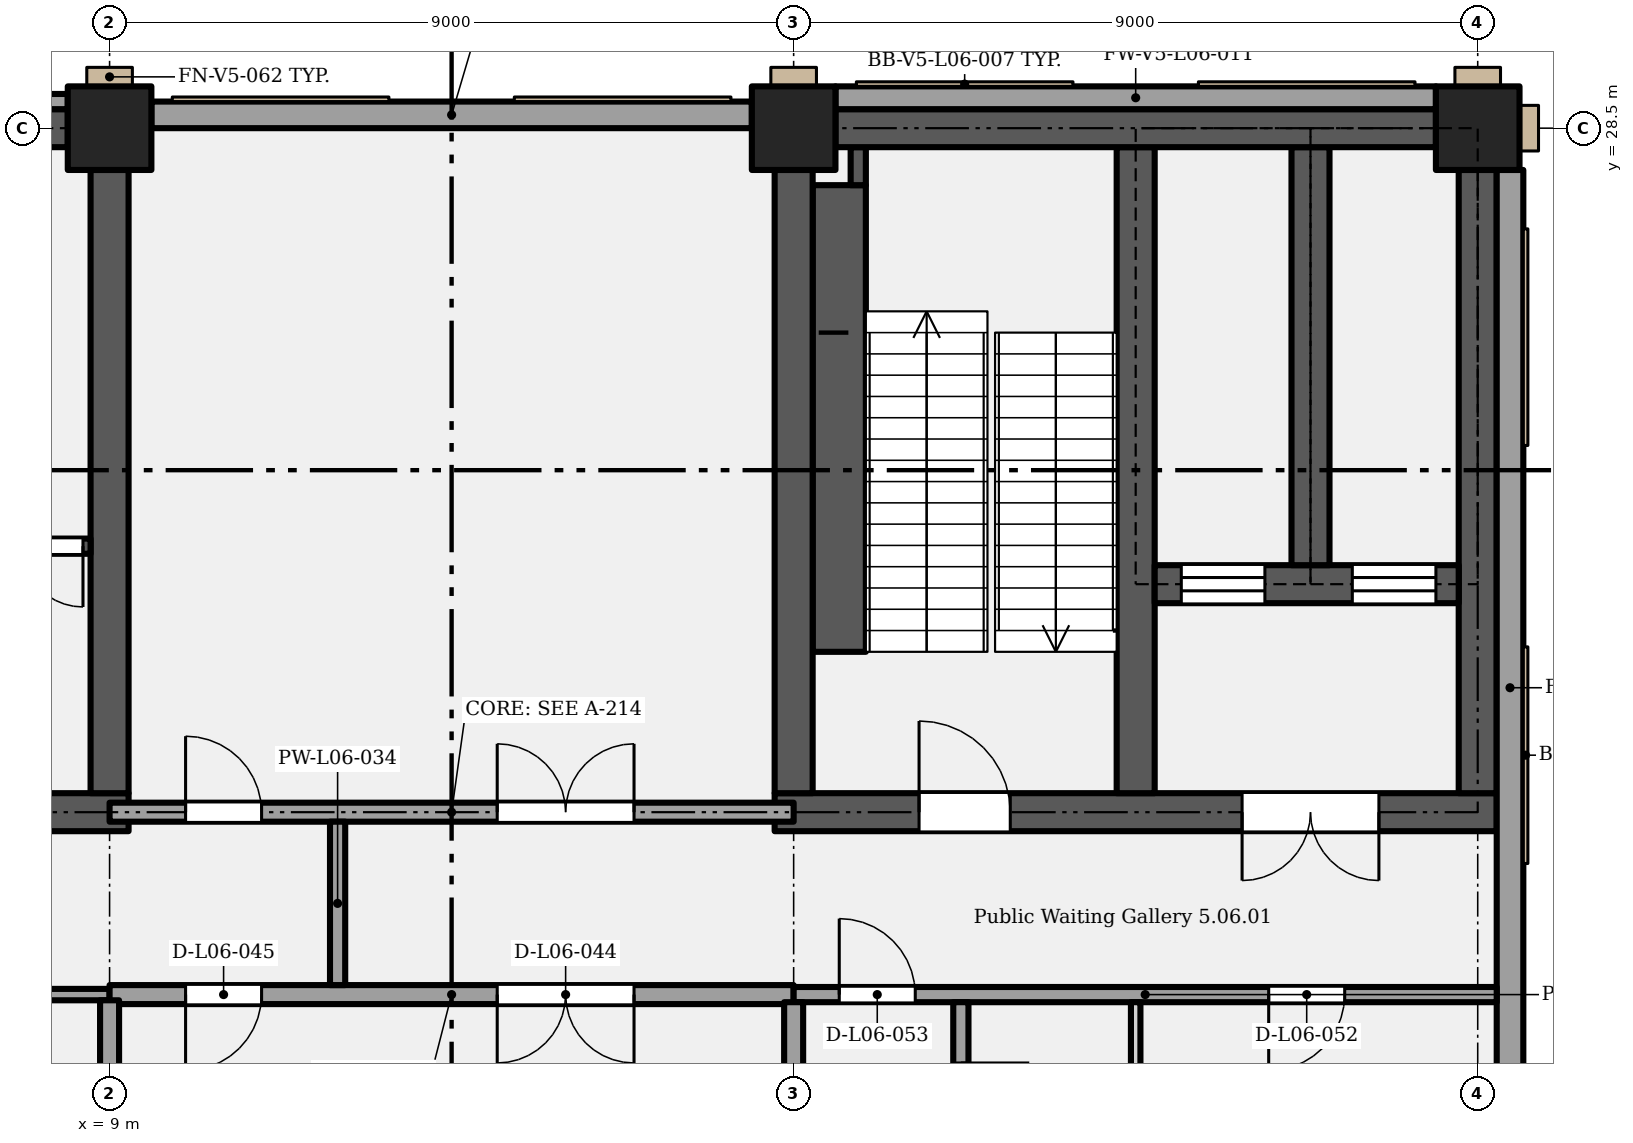
"""IFC4 building model, lengths in metres.
Left out: names, types, materials, properties, quantities, classifications, styles, units other than length and angle.
Written with IfcOpenShell. Run it as: python <this file> out.ifc"""

import sys

from ifc_helpers import new_model, si_unit, direction, frame, frame_2d, origin, origin_2d, place, context, subcontext, project, spatial, rectangle, extrude, element, fill, save


model = new_model("IFC4")
c1 = context("Model", 3, precision=1e-05, world=origin(), true_north=direction((0.0, 1.0)))
c2 = subcontext(c1, "Body", "Model", "MODEL_VIEW")
j1 = project(units=[si_unit("LENGTHUNIT", "METRE"), si_unit("PLANEANGLEUNIT", "RADIAN")], contexts=[c1])
p1 = place(None, origin())
s1 = spatial("IfcSite", under=j1, at=p1, CompositionType="ELEMENT")
p2 = place(p1, origin())
s2 = spatial("IfcBuilding", under=s1, at=p2, CompositionType="ELEMENT")
p3 = place(p2, frame((0.0, 0.0, 33.6)))
s3 = spatial("IfcBuildingStorey", under=s2, at=p3, CompositionType="ELEMENT", Elevation=33.6)
for number, where, z_axis, x_axis in (
    (1, (9.0, 28.5, 0.0), (0.0, 0.0, 1.0), (1.0, 0.0, 0.0)),
    (2, (18.0, 28.5, 0.0), (0.0, 0.0, 1.0), (1.0, 0.0, 0.0)),
    (3, (27.0, 28.5, 0.0), (0.0, 0.0, 1.0), (1.0, 0.0, 0.0)),
):
    element("IfcColumn", number, at=place(p3, frame(where, z_axis=z_axis, x_axis=x_axis)), inside=s3, PredefinedType="COLUMN", context=c2, shape_type="SweptSolid", body=[
        extrude(rectangle(XDim=1.1, YDim=1.1, at=origin_2d()), origin(), (0.0, 0.0, 1.0), 5.4),
    ])
p4 = place(p3, frame((-0.25, 19.5, 0.0), z_axis=(0.0, 0.0, 1.0), x_axis=(1.0, 0.0, 0.0)))
e4 = element("IfcWall", 4, at=p4, inside=s3, PredefinedType="SHEAR", context=c2, shape_type="SweptSolid", body=[
    extrude(rectangle(XDim=9.5, YDim=0.5, at=frame_2d((4.75, 0.0))), origin(), (0.0, 0.0, 1.0), 5.15),
])
p5 = place(p4, frame((1.9, 0.0, 0.0)))
e5 = element("IfcOpeningElement", 5, at=p5, cuts=e4, PredefinedType="OPENING", context=c2, shape_type="SweptSolid", body=[
    extrude(rectangle(XDim=1.2, YDim=2.1, at=frame_2d((0.6, 1.05))), frame((0.0, 0.26, 0.0), z_axis=(0.0, -1.0, 0.0), x_axis=(1.0, 0.0, 0.0)), (0.0, 0.0, 1.0), 0.52),
])
p6 = place(p4, frame((6.4, 0.0, 0.0)))
e6 = element("IfcOpeningElement", 6, at=p6, cuts=e4, PredefinedType="OPENING", context=c2, shape_type="SweptSolid", body=[
    extrude(rectangle(XDim=1.2, YDim=2.1, at=frame_2d((0.6, 1.05))), frame((0.0, 0.26, 0.0), z_axis=(0.0, -1.0, 0.0), x_axis=(1.0, 0.0, 0.0)), (0.0, 0.0, 1.0), 0.52),
])
p7 = place(p3, frame((17.75, 19.5, 0.0), z_axis=(0.0, 0.0, 1.0), x_axis=(1.0, 0.0, 0.0)))
e7 = element("IfcWall", 7, at=p7, inside=s3, PredefinedType="SHEAR", context=c2, shape_type="SweptSolid", body=[
    extrude(rectangle(XDim=9.5, YDim=0.5, at=frame_2d((4.75, 0.0))), origin(), (0.0, 0.0, 1.0), 5.15),
])
p8 = place(p7, frame((1.9, 0.0, 0.0)))
e8 = element("IfcOpeningElement", 8, at=p8, cuts=e7, PredefinedType="OPENING", context=c2, shape_type="SweptSolid", body=[
    extrude(rectangle(XDim=1.2, YDim=2.1, at=frame_2d((0.6, 1.05))), frame((0.0, 0.26, 0.0), z_axis=(0.0, -1.0, 0.0), x_axis=(1.0, 0.0, 0.0)), (0.0, 0.0, 1.0), 0.52),
])
p9 = place(p7, frame((7.95, 0.0, 0.0), z_axis=(0.0, 0.0, 1.0), x_axis=(-1.0, 0.0, 0.0)))
e9 = element("IfcOpeningElement", 9, at=p9, cuts=e7, PredefinedType="OPENING", context=c2, shape_type="SweptSolid", body=[
    extrude(rectangle(XDim=1.8, YDim=2.1, at=frame_2d((0.9, 1.05))), frame((0.0, 0.26, 0.0), z_axis=(0.0, -1.0, 0.0), x_axis=(1.0, 0.0, 0.0)), (0.0, 0.0, 1.0), 0.52),
])
for number, where, z_axis, x_axis in (
    (10, (9.0, 19.75, 0.0), (0.0, 0.0, 1.0), (0.0, 1.0, 0.0)),
    (11, (18.0, 19.75, 0.0), (0.0, 0.0, 1.0), (0.0, 1.0, 0.0)),
):
    element("IfcWall", number, at=place(p3, frame(where, z_axis=z_axis, x_axis=x_axis)), inside=s3, PredefinedType="SHEAR", context=c2, shape_type="SweptSolid", body=[
        extrude(rectangle(XDim=8.2, YDim=0.5, at=frame_2d((4.1, 0.0))), origin(), (0.0, 0.0, 1.0), 5.15),
    ])
p10 = place(p3, frame((22.5, 19.75, 0.0), z_axis=(0.0, 0.0, 1.0), x_axis=(0.0, 1.0, 0.0)))
e12 = element("IfcWall", 12, at=p10, inside=s3, PredefinedType="SHEAR", context=c2, shape_type="SweptSolid", body=[
    extrude(rectangle(XDim=8.5, YDim=0.5, at=frame_2d((4.25, 0.0))), origin(), (0.0, 0.0, 1.0), 5.15),
])
p11 = place(p3, frame((27.0, 19.75, 0.0), z_axis=(0.0, 0.0, 1.0), x_axis=(0.0, 1.0, 0.0)))
e13 = element("IfcWall", 13, at=p11, inside=s3, PredefinedType="SHEAR", context=c2, shape_type="SweptSolid", body=[
    extrude(rectangle(XDim=8.2, YDim=0.5, at=frame_2d((4.1, 0.0))), origin(), (0.0, 0.0, 1.0), 5.15),
])
p12 = place(p3, frame((22.75, 22.5, 0.0), z_axis=(0.0, 0.0, 1.0), x_axis=(1.0, 0.0, 0.0)))
e14 = element("IfcWall", 14, at=p12, inside=s3, PredefinedType="SHEAR", context=c2, shape_type="SweptSolid", body=[
    extrude(rectangle(XDim=4.0, YDim=0.5, at=frame_2d((2.0, 0.0))), origin(), (0.0, 0.0, 1.0), 5.15),
])
p13 = place(p12, frame((0.35, 0.0, 0.0)))
e15 = element("IfcOpeningElement", 15, at=p13, cuts=e14, PredefinedType="OPENING", context=c2, shape_type="SweptSolid", body=[
    extrude(rectangle(XDim=1.1, YDim=2.1, at=frame_2d((0.55, 1.05))), frame((0.0, 0.26, 0.0), z_axis=(0.0, -1.0, 0.0), x_axis=(1.0, 0.0, 0.0)), (0.0, 0.0, 1.0), 0.52),
])
p14 = place(p12, frame((2.6, 0.0, 0.0)))
e16 = element("IfcOpeningElement", 16, at=p14, cuts=e14, PredefinedType="OPENING", context=c2, shape_type="SweptSolid", body=[
    extrude(rectangle(XDim=1.1, YDim=2.1, at=frame_2d((0.55, 1.05))), frame((0.0, 0.26, 0.0), z_axis=(0.0, -1.0, 0.0), x_axis=(1.0, 0.0, 0.0)), (0.0, 0.0, 1.0), 0.52),
])
p15 = place(p3, frame((24.8, 22.75, 0.0), z_axis=(0.0, 0.0, 1.0), x_axis=(0.0, 1.0, 0.0)))
e17 = element("IfcWall", 17, at=p15, inside=s3, PredefinedType="SHEAR", context=c2, shape_type="SweptSolid", body=[
    extrude(rectangle(XDim=5.5, YDim=0.5, at=frame_2d((2.75, 0.0))), origin(), (0.0, 0.0, 1.0), 5.15),
])
p16 = place(p3, frame((0.45, 28.5, 0.0), z_axis=(0.0, 0.0, 1.0), x_axis=(1.0, 0.0, 0.0)))
e18 = element("IfcWall", 18, at=p16, inside=s3, PredefinedType="SHEAR", context=c2, shape_type="SweptSolid", body=[
    extrude(rectangle(XDim=8.0, YDim=0.5, at=frame_2d((4.0, 0.0))), origin(), (0.0, 0.0, 1.0), 5.15),
])
p17 = place(p3, frame((18.55, 28.5, 0.0), z_axis=(0.0, 0.0, 1.0), x_axis=(1.0, 0.0, 0.0)))
e19 = element("IfcWall", 19, at=p17, inside=s3, PredefinedType="SHEAR", context=c2, shape_type="SweptSolid", body=[
    extrude(rectangle(XDim=7.9, YDim=0.5, at=frame_2d((3.95, 0.0))), origin(), (0.0, 0.0, 1.0), 5.15),
])
p18 = place(p3, frame((0.45, 28.85, 0.0), z_axis=(0.0, 0.0, 1.0), x_axis=(1.0, 0.0, 0.0)))
e20 = element("IfcWall", 20, at=p18, inside=s3, PredefinedType="SOLIDWALL", context=c2, shape_type="SweptSolid", body=[
    extrude(rectangle(XDim=8.0, YDim=0.2, at=frame_2d((4.0, 0.0))), origin(), (0.0, 0.0, 1.0), 5.15),
])
p19 = place(p3, frame((9.55, 28.675, 0.0), z_axis=(0.0, 0.0, 1.0), x_axis=(1.0, 0.0, 0.0)))
e21 = element("IfcWall", 21, at=p19, inside=s3, PredefinedType="SOLIDWALL", context=c2, shape_type="SweptSolid", body=[
    extrude(rectangle(XDim=7.9, YDim=0.35, at=frame_2d((3.95, 0.0))), origin(), (0.0, 0.0, 1.0), 5.15),
])
p20 = place(p3, frame((18.55, 28.9, 0.0), z_axis=(0.0, 0.0, 1.0), x_axis=(1.0, 0.0, 0.0)))
e22 = element("IfcWall", 22, at=p20, inside=s3, PredefinedType="SOLIDWALL", context=c2, shape_type="SweptSolid", body=[
    extrude(rectangle(XDim=7.9, YDim=0.3, at=frame_2d((3.95, 0.0))), origin(), (0.0, 0.0, 1.0), 5.15),
])
p21 = place(p3, frame((27.425, 14.325, 0.0), z_axis=(0.0, 0.0, 1.0), x_axis=(0.0, 1.0, 0.0)))
e23 = element("IfcWall", 23, at=p21, inside=s3, PredefinedType="SOLIDWALL", context=c2, shape_type="SweptSolid", body=[
    extrude(rectangle(XDim=13.625, YDim=0.35, at=frame_2d((6.812, 0.0))), origin(), (0.0, 0.0, 1.0), 5.15),
])
p22 = place(p3, frame((-0.25, 17.1, 0.0), z_axis=(0.0, 0.0, 1.0), x_axis=(1.0, 0.0, 0.0)))
e24 = element("IfcWall", 24, at=p22, inside=s3, PredefinedType="PARTITIONING", context=c2, shape_type="SweptSolid", body=[
    extrude(rectangle(XDim=9.25, YDim=0.15, at=frame_2d((4.625, 0.0))), origin(), (0.0, 0.0, 1.0), 5.15),
])
p23 = place(p22, frame((5.25, 0.0, 0.0), z_axis=(0.0, 0.0, 1.0), x_axis=(-1.0, 0.0, 0.0)))
e25 = element("IfcOpeningElement", 25, at=p23, cuts=e24, PredefinedType="OPENING", context=c2, shape_type="SweptSolid", body=[
    extrude(rectangle(XDim=1.0, YDim=2.1, at=frame_2d((0.5, 1.05))), frame((0.0, 0.085, 0.0), z_axis=(0.0, -1.0, 0.0), x_axis=(1.0, 0.0, 0.0)), (0.0, 0.0, 1.0), 0.17),
])
p24 = place(p3, frame((9.0, 17.1, 0.0), z_axis=(0.0, 0.0, 1.0), x_axis=(1.0, 0.0, 0.0)))
e26 = element("IfcWall", 26, at=p24, inside=s3, PredefinedType="PARTITIONING", context=c2, shape_type="SweptSolid", body=[
    extrude(rectangle(XDim=9.0, YDim=0.25, at=frame_2d((4.5, 0.0))), origin(), (0.0, 0.0, 1.0), 5.15),
])
p25 = place(p24, frame((6.9, 0.0, 0.0), z_axis=(0.0, 0.0, 1.0), x_axis=(-1.0, 0.0, 0.0)))
e27 = element("IfcOpeningElement", 27, at=p25, cuts=e26, PredefinedType="OPENING", context=c2, shape_type="SweptSolid", body=[
    extrude(rectangle(XDim=1.8, YDim=2.4, at=frame_2d((0.9, 1.2))), frame((0.0, 0.135, 0.0), z_axis=(0.0, -1.0, 0.0), x_axis=(1.0, 0.0, 0.0)), (0.0, 0.0, 1.0), 0.27),
])
p26 = place(p24, frame((2.0, 0.0, 0.0), z_axis=(0.0, 0.0, 1.0), x_axis=(-1.0, 0.0, 0.0)))
e28 = element("IfcOpeningElement", 28, at=p26, cuts=e26, PredefinedType="OPENING", context=c2, shape_type="SweptSolid", body=[
    extrude(rectangle(XDim=1.0, YDim=2.1, at=frame_2d((0.5, 1.05))), frame((0.0, 0.135, 0.0), z_axis=(0.0, -1.0, 0.0), x_axis=(1.0, 0.0, 0.0)), (0.0, 0.0, 1.0), 0.27),
])
p27 = place(p3, frame((18.0, 17.1, 0.0), z_axis=(0.0, 0.0, 1.0), x_axis=(1.0, 0.0, 0.0)))
e29 = element("IfcWall", 29, at=p27, inside=s3, PredefinedType="PARTITIONING", context=c2, shape_type="SweptSolid", body=[
    extrude(rectangle(XDim=9.25, YDim=0.2, at=frame_2d((4.625, 0.0))), origin(), (0.0, 0.0, 1.0), 5.15),
])
p28 = place(p27, frame((7.25, 0.0, 0.0), z_axis=(0.0, 0.0, 1.0), x_axis=(-1.0, 0.0, 0.0)))
e30 = element("IfcOpeningElement", 30, at=p28, cuts=e29, PredefinedType="OPENING", context=c2, shape_type="SweptSolid", body=[
    extrude(rectangle(XDim=1.0, YDim=2.1, at=frame_2d((0.5, 1.05))), frame((0.0, 0.11, 0.0), z_axis=(0.0, -1.0, 0.0), x_axis=(1.0, 0.0, 0.0)), (0.0, 0.0, 1.0), 0.22),
])
p29 = place(p27, frame((0.6, 0.0, 0.0)))
e31 = element("IfcOpeningElement", 31, at=p29, cuts=e29, PredefinedType="OPENING", context=c2, shape_type="SweptSolid", body=[
    extrude(rectangle(XDim=1.0, YDim=2.1, at=frame_2d((0.5, 1.05))), frame((0.0, 0.11, 0.0), z_axis=(0.0, -1.0, 0.0), x_axis=(1.0, 0.0, 0.0)), (0.0, 0.0, 1.0), 0.22),
])
p30 = place(p3, frame((9.0, 19.5, 0.0), z_axis=(0.0, 0.0, 1.0), x_axis=(1.0, 0.0, 0.0)))
e32 = element("IfcWall", 32, at=p30, inside=s3, PredefinedType="PARTITIONING", context=c2, shape_type="SweptSolid", body=[
    extrude(rectangle(XDim=9.0, YDim=0.25, at=frame_2d((4.5, 0.0))), origin(), (0.0, 0.0, 1.0), 5.15),
])
p31 = place(p30, frame((5.1, 0.0, 0.0)))
e33 = element("IfcOpeningElement", 33, at=p31, cuts=e32, PredefinedType="OPENING", context=c2, shape_type="SweptSolid", body=[
    extrude(rectangle(XDim=1.8, YDim=2.4, at=frame_2d((0.9, 1.2))), frame((0.0, 0.135, 0.0), z_axis=(0.0, -1.0, 0.0), x_axis=(1.0, 0.0, 0.0)), (0.0, 0.0, 1.0), 0.27),
])
p32 = place(p30, frame((1.0, 0.0, 0.0)))
e34 = element("IfcOpeningElement", 34, at=p32, cuts=e32, PredefinedType="OPENING", context=c2, shape_type="SweptSolid", body=[
    extrude(rectangle(XDim=1.0, YDim=2.1, at=frame_2d((0.5, 1.05))), frame((0.0, 0.135, 0.0), z_axis=(0.0, -1.0, 0.0), x_axis=(1.0, 0.0, 0.0)), (0.0, 0.0, 1.0), 0.27),
])
p33 = place(p3, frame((7.5, 23.0, 0.0), z_axis=(0.0, 0.0, 1.0), x_axis=(1.0, 0.0, 0.0)))
e35 = element("IfcWall", 35, at=p33, inside=s3, PredefinedType="SHEAR", context=c2, shape_type="SweptSolid", body=[
    extrude(rectangle(XDim=1.25, YDim=0.2, at=frame_2d((0.625, 0.0))), origin(), (0.0, 0.0, 1.0), 5.15),
])
p34 = place(p33, frame((1.15, 0.0, 0.0), z_axis=(0.0, 0.0, 1.0), x_axis=(-1.0, 0.0, 0.0)))
e36 = element("IfcOpeningElement", 36, at=p34, cuts=e35, PredefinedType="OPENING", context=c2, shape_type="SweptSolid", body=[
    extrude(rectangle(XDim=0.8, YDim=2.0, at=frame_2d((0.4, 1.0))), frame((0.0, 0.11, 0.0), z_axis=(0.0, -1.0, 0.0), x_axis=(1.0, 0.0, 0.0)), (0.0, 0.0, 1.0), 0.22),
])
p35 = place(p3, frame((9.0, 12.55, 0.0), z_axis=(0.0, 0.0, 1.0), x_axis=(0.0, 1.0, 0.0)))
e37 = element("IfcWall", 37, at=p35, inside=s3, PredefinedType="PARTITIONING", context=c2, shape_type="SweptSolid", body=[
    extrude(rectangle(XDim=4.475, YDim=0.25, at=frame_2d((2.237, 0.0))), origin(), (0.0, 0.0, 1.0), 4.2),
])
p36 = place(p3, frame((12.0, 17.225, 0.0), z_axis=(0.0, 0.0, 1.0), x_axis=(0.0, 1.0, 0.0)))
e38 = element("IfcWall", 38, at=p36, inside=s3, PredefinedType="PARTITIONING", context=c2, shape_type="SweptSolid", body=[
    extrude(rectangle(XDim=2.15, YDim=0.2, at=frame_2d((1.075, 0.0))), origin(), (0.0, 0.0, 1.0), 5.15),
])
p37 = place(p3, frame((18.0, 12.55, 0.0), z_axis=(0.0, 0.0, 1.0), x_axis=(0.0, 1.0, 0.0)))
e39 = element("IfcWall", 39, at=p37, inside=s3, PredefinedType="PARTITIONING", context=c2, shape_type="SweptSolid", body=[
    extrude(rectangle(XDim=4.45, YDim=0.25, at=frame_2d((2.225, 0.0))), origin(), (0.0, 0.0, 1.0), 4.2),
])
p38 = place(p3, frame((20.2, 9.663, 0.0), z_axis=(0.0, 0.0, 1.0), x_axis=(0.0, 1.0, 0.0)))
e40 = element("IfcWall", 40, at=p38, inside=s3, PredefinedType="PARTITIONING", context=c2, shape_type="SweptSolid", body=[
    extrude(rectangle(XDim=7.337, YDim=0.2, at=frame_2d((3.669, 0.0))), origin(), (0.0, 0.0, 1.0), 5.15),
])
p39 = place(p38, frame((6.537, 0.0, 0.0), z_axis=(0.0, 0.0, 1.0), x_axis=(-1.0, 0.0, 0.0)))
e41 = element("IfcOpeningElement", 41, at=p39, cuts=e40, PredefinedType="OPENING", context=c2, shape_type="SweptSolid", body=[
    extrude(rectangle(XDim=0.9, YDim=2.1, at=frame_2d((0.45, 1.05))), frame((0.0, 0.11, 0.0), z_axis=(0.0, -1.0, 0.0), x_axis=(1.0, 0.0, 0.0)), (0.0, 0.0, 1.0), 0.22),
])
p40 = place(p38, frame((3.837, 0.0, 0.0), z_axis=(0.0, 0.0, 1.0), x_axis=(-1.0, 0.0, 0.0)))
e42 = element("IfcOpeningElement", 42, at=p40, cuts=e40, PredefinedType="OPENING", context=c2, shape_type="SweptSolid", body=[
    extrude(rectangle(XDim=0.9, YDim=2.1, at=frame_2d((0.45, 1.05))), frame((0.0, 0.11, 0.0), z_axis=(0.0, -1.0, 0.0), x_axis=(1.0, 0.0, 0.0)), (0.0, 0.0, 1.0), 0.22),
])
p41 = place(p38, frame((1.488, 0.0, 0.0), z_axis=(0.0, 0.0, 1.0), x_axis=(-1.0, 0.0, 0.0)))
e43 = element("IfcOpeningElement", 43, at=p41, cuts=e40, PredefinedType="OPENING", context=c2, shape_type="SweptSolid", body=[
    extrude(rectangle(XDim=1.0, YDim=2.1, at=frame_2d((0.5, 1.05))), frame((0.0, 0.11, 0.0), z_axis=(0.0, -1.0, 0.0), x_axis=(1.0, 0.0, 0.0)), (0.0, 0.0, 1.0), 0.22),
])
p42 = place(p3, frame((22.5, 9.663, 0.0), z_axis=(0.0, 0.0, 1.0), x_axis=(0.0, 1.0, 0.0)))
e44 = element("IfcWall", 44, at=p42, inside=s3, PredefinedType="PARTITIONING", context=c2, shape_type="SweptSolid", body=[
    extrude(rectangle(XDim=7.337, YDim=0.125, at=frame_2d((3.669, 0.0))), origin(), (0.0, 0.0, 1.0), 5.15),
])
p43 = place(p3, frame((18.6, 21.61, 0.0), z_axis=(0.0, 0.0, 1.0), x_axis=(0.0, 1.0, 0.0)))
e45 = element("IfcWall", 45, at=p43, inside=s3, PredefinedType="SHEAR", context=c2, shape_type="SweptSolid", body=[
    extrude(rectangle(XDim=6.14, YDim=0.7, at=frame_2d((3.07, 0.0))), origin(), (0.0, 0.0, 1.0), 2.587),
])
p44 = place(p3, frame((18.85, 27.75, 0.0), z_axis=(0.0, 0.0, 1.0), x_axis=(0.0, 1.0, 0.0)))
e46 = element("IfcWall", 46, at=p44, inside=s3, PredefinedType="SHEAR", context=c2, shape_type="SweptSolid", body=[
    extrude(rectangle(XDim=0.5, YDim=0.2, at=frame_2d((0.25, 0.0))), origin(), (0.0, 0.0, 1.0), 2.587),
])
p45 = place(p34, origin())
e47 = element("IfcDoor", 47, at=p45, inside=s3, OperationType="SINGLE_SWING_LEFT", PredefinedType="DOOR", context=c2, shape_type="SweptSolid", body=[
    extrude(rectangle(XDim=0.8, YDim=2.0, at=frame_2d((0.4, 1.0))), frame((0.0, 0.025, 0.0), z_axis=(0.0, -1.0, 0.0), x_axis=(1.0, 0.0, 0.0)), (0.0, 0.0, 1.0), 0.05),
])
fill(e36, e47)
p46 = place(p8, origin())
e48 = element("IfcDoor", 48, at=p46, inside=s3, OperationType="SINGLE_SWING_LEFT", PredefinedType="DOOR", context=c2, shape_type="SweptSolid", body=[
    extrude(rectangle(XDim=1.2, YDim=2.1, at=frame_2d((0.6, 1.05))), frame((0.0, 0.025, 0.0), z_axis=(0.0, -1.0, 0.0), x_axis=(1.0, 0.0, 0.0)), (0.0, 0.0, 1.0), 0.05),
])
fill(e8, e48)
p47 = place(p9, origin())
e49 = element("IfcDoor", 49, at=p47, inside=s3, OperationType="DOUBLE_DOOR_SINGLE_SWING", PredefinedType="DOOR", context=c2, shape_type="SweptSolid", body=[
    extrude(rectangle(XDim=1.8, YDim=2.1, at=frame_2d((0.9, 1.05))), frame((0.0, 0.025, 0.0), z_axis=(0.0, -1.0, 0.0), x_axis=(1.0, 0.0, 0.0)), (0.0, 0.0, 1.0), 0.05),
])
fill(e9, e49)
p48 = place(p13, origin())
e50 = element("IfcDoor", 50, at=p48, inside=s3, OperationType="SLIDING_TO_LEFT", PredefinedType="DOOR", context=c2, shape_type="SweptSolid", body=[
    extrude(rectangle(XDim=1.1, YDim=2.1, at=frame_2d((0.55, 1.05))), frame((0.0, 0.025, 0.0), z_axis=(0.0, -1.0, 0.0), x_axis=(1.0, 0.0, 0.0)), (0.0, 0.0, 1.0), 0.05),
])
fill(e15, e50)
p49 = place(p14, origin())
e51 = element("IfcDoor", 51, at=p49, inside=s3, OperationType="SLIDING_TO_LEFT", PredefinedType="DOOR", context=c2, shape_type="SweptSolid", body=[
    extrude(rectangle(XDim=1.1, YDim=2.1, at=frame_2d((0.55, 1.05))), frame((0.0, 0.025, 0.0), z_axis=(0.0, -1.0, 0.0), x_axis=(1.0, 0.0, 0.0)), (0.0, 0.0, 1.0), 0.05),
])
fill(e16, e51)
p50 = place(p25, origin())
e52 = element("IfcDoor", 52, at=p50, inside=s3, OperationType="DOUBLE_DOOR_SINGLE_SWING", PredefinedType="DOOR", context=c2, shape_type="SweptSolid", body=[
    extrude(rectangle(XDim=1.8, YDim=2.4, at=frame_2d((0.9, 1.2))), frame((0.0, 0.025, 0.0), z_axis=(0.0, -1.0, 0.0), x_axis=(1.0, 0.0, 0.0)), (0.0, 0.0, 1.0), 0.05),
])
fill(e27, e52)
p51 = place(p26, origin())
e53 = element("IfcDoor", 53, at=p51, inside=s3, OperationType="SINGLE_SWING_RIGHT", PredefinedType="DOOR", context=c2, shape_type="SweptSolid", body=[
    extrude(rectangle(XDim=1.0, YDim=2.1, at=frame_2d((0.5, 1.05))), frame((0.0, 0.025, 0.0), z_axis=(0.0, -1.0, 0.0), x_axis=(1.0, 0.0, 0.0)), (0.0, 0.0, 1.0), 0.05),
])
fill(e28, e53)
p52 = place(p31, origin())
e54 = element("IfcDoor", 54, at=p52, inside=s3, OperationType="DOUBLE_DOOR_SINGLE_SWING", PredefinedType="DOOR", context=c2, shape_type="SweptSolid", body=[
    extrude(rectangle(XDim=1.8, YDim=2.4, at=frame_2d((0.9, 1.2))), frame((0.0, 0.025, 0.0), z_axis=(0.0, -1.0, 0.0), x_axis=(1.0, 0.0, 0.0)), (0.0, 0.0, 1.0), 0.05),
])
fill(e33, e54)
p53 = place(p32, origin())
e55 = element("IfcDoor", 55, at=p53, inside=s3, OperationType="SINGLE_SWING_LEFT", PredefinedType="DOOR", context=c2, shape_type="SweptSolid", body=[
    extrude(rectangle(XDim=1.0, YDim=2.1, at=frame_2d((0.5, 1.05))), frame((0.0, 0.025, 0.0), z_axis=(0.0, -1.0, 0.0), x_axis=(1.0, 0.0, 0.0)), (0.0, 0.0, 1.0), 0.05),
])
fill(e34, e55)
p54 = place(p28, origin())
e56 = element("IfcDoor", 56, at=p54, inside=s3, OperationType="SINGLE_SWING_RIGHT", PredefinedType="DOOR", context=c2, shape_type="SweptSolid", body=[
    extrude(rectangle(XDim=1.0, YDim=2.1, at=frame_2d((0.5, 1.05))), frame((0.0, 0.025, 0.0), z_axis=(0.0, -1.0, 0.0), x_axis=(1.0, 0.0, 0.0)), (0.0, 0.0, 1.0), 0.05),
])
fill(e30, e56)
p55 = place(p29, origin())
e57 = element("IfcDoor", 57, at=p55, inside=s3, OperationType="SINGLE_SWING_LEFT", PredefinedType="DOOR", context=c2, shape_type="SweptSolid", body=[
    extrude(rectangle(XDim=1.0, YDim=2.1, at=frame_2d((0.5, 1.05))), frame((0.0, 0.025, 0.0), z_axis=(0.0, -1.0, 0.0), x_axis=(1.0, 0.0, 0.0)), (0.0, 0.0, 1.0), 0.05),
])
fill(e31, e57)
save(model, sys.argv[1])
